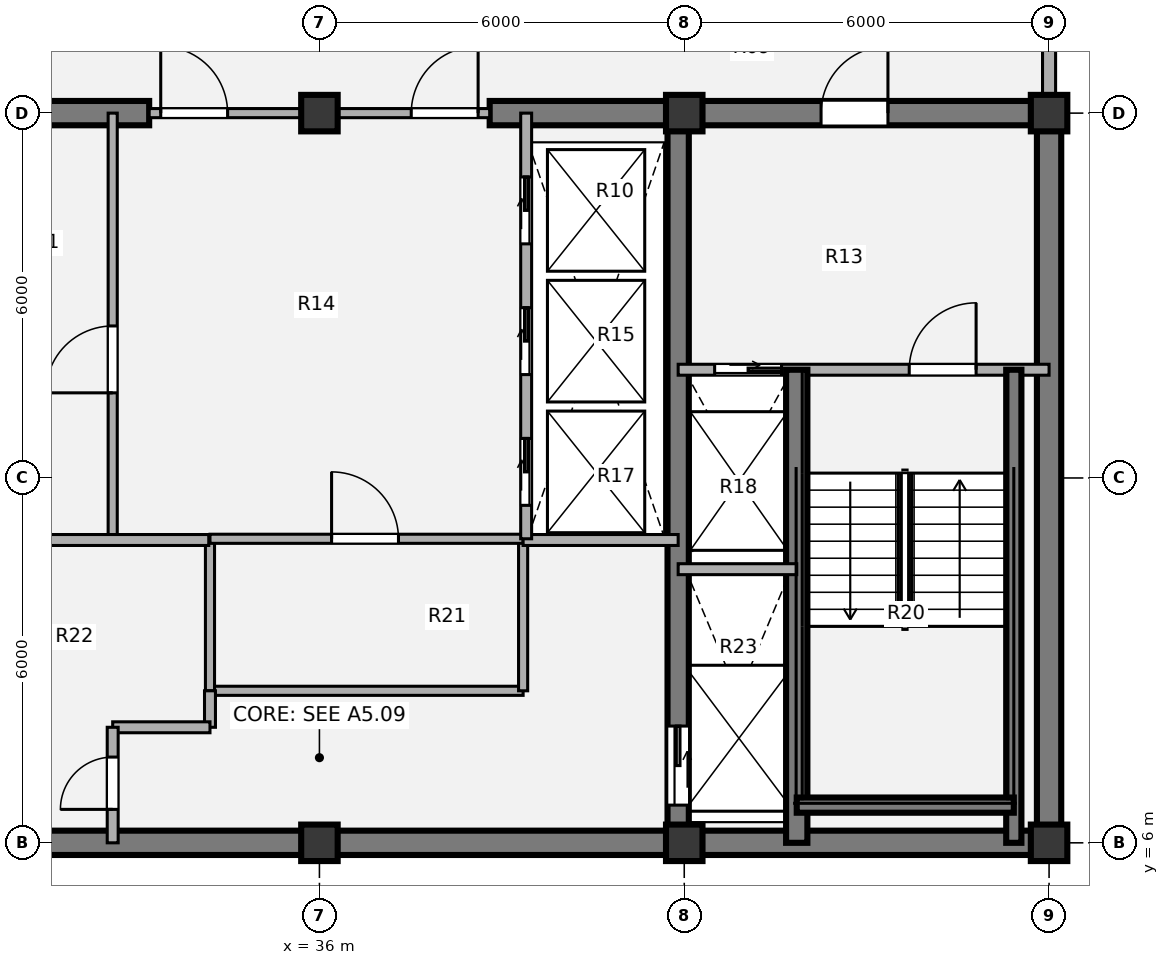
"""IFC4 building model, lengths in metres.
Left out: names, types, materials, properties, quantities, classifications, styles, units other than length and angle.
Written with IfcOpenShell. Run it as: python <this file> out.ifc"""

import sys

from ifc_helpers import new_model, si_unit, direction, frame, frame_2d, origin, origin_2d, place, context, subcontext, project, spatial, rectangle, extrude, source, transform, mapped, element, fill, save


model = new_model("IFC4")
c1 = context("Model", 3, precision=1e-05, world=origin(), true_north=direction((0.0, 1.0)))
c2 = subcontext(c1, "Body", "Model", "MODEL_VIEW")
j1 = project(units=[si_unit("LENGTHUNIT", "METRE"), si_unit("PLANEANGLEUNIT", "RADIAN")], contexts=[c1])
p1 = place(None, origin())
s1 = spatial("IfcSite", under=j1, at=p1, CompositionType="ELEMENT")
p2 = place(p1, origin())
s2 = spatial("IfcBuilding", under=s1, at=p2, CompositionType="ELEMENT")
p3 = place(p2, frame((0.0, 0.0, 253.26)))
s3 = spatial("IfcBuildingStorey", under=s2, at=p3, CompositionType="ELEMENT", Elevation=253.26)
m1 = source(origin(), c2, "Body", "SweptSolid", [
    extrude(rectangle(XDim=0.6, YDim=0.6, at=origin_2d()), origin(), (0.0, 0.0, 1.0), 3.78),
])
for number, where, z_axis, x_axis in (
    (1, (36.0, 6.0, 0.0), (0.0, 0.0, 1.0), (1.0, 0.0, 0.0)),
    (2, (42.0, 6.0, 0.0), (0.0, 0.0, 1.0), (1.0, 0.0, 0.0)),
    (3, (48.0, 6.0, 0.0), (0.0, 0.0, 1.0), (1.0, 0.0, 0.0)),
    (4, (36.0, 18.0, 0.0), (0.0, 0.0, 1.0), (1.0, 0.0, 0.0)),
    (5, (42.0, 18.0, 0.0), (0.0, 0.0, 1.0), (1.0, 0.0, 0.0)),
    (6, (48.0, 18.0, 0.0), (0.0, 0.0, 1.0), (1.0, 0.0, 0.0)),
):
    element("IfcColumn", number, at=place(p3, frame(where, z_axis=z_axis, x_axis=x_axis)), inside=s3, PredefinedType="COLUMN", context=c2, shape_type="MappedRepresentation", body=[
        mapped(m1, transform((0.0, 0.0, 0.0), x_axis=(1.0, 0.0, 0.0), y_axis=(0.0, 1.0, 0.0), z_axis=(0.0, 0.0, 1.0), scale=1.0)),
    ])
p4 = place(p3, frame((48.2, 6.0, 0.0), z_axis=(0.0, 0.0, 1.0), x_axis=(-1.0, 0.0, 0.0)))
e7 = element("IfcWall", 7, at=p4, inside=s3, PredefinedType="SHEAR", context=c2, shape_type="SweptSolid", body=[
    extrude(rectangle(XDim=24.4, YDim=0.4, at=frame_2d((12.2, 0.0))), origin(), (0.0, 0.0, 1.0), 3.78),
])
p5 = place(p3, frame((48.0, 18.0, 0.0), z_axis=(0.0, 0.0, 1.0), x_axis=(0.0, -1.0, 0.0)))
e8 = element("IfcWall", 8, at=p5, inside=s3, PredefinedType="SHEAR", context=c2, shape_type="SweptSolid", body=[
    extrude(rectangle(XDim=12.0, YDim=0.4, at=frame_2d((6.0, 0.0))), origin(), (0.0, 0.0, 1.0), 3.78),
])
p6 = place(p3, frame((23.8, 18.0, 0.0), z_axis=(0.0, 0.0, 1.0), x_axis=(1.0, 0.0, 0.0)))
e9 = element("IfcWall", 9, at=p6, inside=s3, PredefinedType="SHEAR", context=c2, shape_type="SweptSolid", body=[
    extrude(rectangle(XDim=9.4, YDim=0.4, at=frame_2d((4.7, 0.0))), origin(), (0.0, 0.0, 1.0), 3.78),
])
p7 = place(p6, frame((2.95, 0.0, 0.0)))
e10 = element("IfcOpeningElement", 10, at=p7, cuts=e9, PredefinedType="OPENING", context=c2, shape_type="SweptSolid", body=[
    extrude(rectangle(XDim=1.1, YDim=2.1, at=origin_2d()), frame((0.55, 0.21, 1.05), z_axis=(0.0, -1.0, 0.0), x_axis=(1.0, 0.0, 0.0)), (0.0, 0.0, 1.0), 0.42),
])
p8 = place(p3, frame((38.8, 18.0, 0.0), z_axis=(0.0, 0.0, 1.0), x_axis=(1.0, 0.0, 0.0)))
e11 = element("IfcWall", 11, at=p8, inside=s3, PredefinedType="SHEAR", context=c2, shape_type="SweptSolid", body=[
    extrude(rectangle(XDim=9.4, YDim=0.4, at=frame_2d((4.7, 0.0))), origin(), (0.0, 0.0, 1.0), 3.78),
])
p9 = place(p8, frame((5.45, 0.0, 0.0)))
e12 = element("IfcOpeningElement", 12, at=p9, cuts=e11, PredefinedType="OPENING", context=c2, shape_type="SweptSolid", body=[
    extrude(rectangle(XDim=1.1, YDim=2.1, at=origin_2d()), frame((0.55, 0.21, 1.05), z_axis=(0.0, -1.0, 0.0), x_axis=(1.0, 0.0, 0.0)), (0.0, 0.0, 1.0), 0.42),
])
p10 = place(p3, frame((41.9, 18.0, 0.0), z_axis=(0.0, 0.0, 1.0), x_axis=(0.0, -1.0, 0.0)))
e13 = element("IfcWall", 13, at=p10, inside=s3, PredefinedType="SHEAR", context=c2, shape_type="SweptSolid", body=[
    extrude(rectangle(XDim=12.0, YDim=0.35, at=frame_2d((6.0, 0.0))), origin(), (0.0, 0.0, 1.0), 3.78),
])
p11 = place(p10, frame((10.08, 0.0, 0.0)))
e14 = element("IfcOpeningElement", 14, at=p11, cuts=e13, PredefinedType="OPENING", context=c2, shape_type="SweptSolid", body=[
    extrude(rectangle(XDim=1.3, YDim=2.1, at=origin_2d()), frame((0.65, 0.185, 1.05), z_axis=(0.0, -1.0, 0.0), x_axis=(1.0, 0.0, 0.0)), (0.0, 0.0, 1.0), 0.37),
])
p12 = place(p3, frame((48.0, 21.05, 0.0), z_axis=(0.0, 0.0, 1.0), x_axis=(0.0, -1.0, 0.0)))
e15 = element("IfcWall", 15, at=p12, inside=s3, PredefinedType="SOLIDWALL", context=c2, shape_type="SweptSolid", body=[
    extrude(rectangle(XDim=2.77, YDim=0.215, at=frame_2d((1.385, 0.0))), origin(), (0.0, 0.0, 1.0), 2.718),
])
p13 = place(p3, frame((32.6, 11.0, 0.0), z_axis=(0.0, 0.0, 1.0), x_axis=(0.0, 1.0, 0.0)))
e16 = element("IfcWall", 16, at=p13, inside=s3, PredefinedType="PARTITIONING", context=c2, shape_type="SweptSolid", body=[
    extrude(rectangle(XDim=7.0, YDim=0.15, at=frame_2d((3.5, 0.0))), origin(), (0.0, 0.0, 1.0), 3.5),
])
p14 = place(p13, frame((2.4, 0.0, 0.0)))
e17 = element("IfcOpeningElement", 17, at=p14, cuts=e16, PredefinedType="OPENING", context=c2, shape_type="SweptSolid", body=[
    extrude(rectangle(XDim=1.1, YDim=2.1, at=origin_2d()), frame((0.55, 0.085, 1.05), z_axis=(0.0, -1.0, 0.0), x_axis=(1.0, 0.0, 0.0)), (0.0, 0.0, 1.0), 0.17),
])
p15 = place(p3, frame((34.2, 8.5, 0.0), z_axis=(0.0, 0.0, 1.0), x_axis=(1.0, 0.0, 0.0)))
e18 = element("IfcWall", 18, at=p15, inside=s3, PredefinedType="PARTITIONING", context=c2, shape_type="SweptSolid", body=[
    extrude(rectangle(XDim=5.15, YDim=0.15, at=frame_2d((2.575, 0.0))), origin(), (0.0, 0.0, 1.0), 3.5),
])
for number, where, z_axis, x_axis in (
    (19, (34.2, 8.5, 0.0), (0.0, 0.0, 1.0), (0.0, 1.0, 0.0)),
    (20, (39.35, 8.5, 0.0), (0.0, 0.0, 1.0), (0.0, 1.0, 0.0)),
):
    element("IfcWall", number, at=place(p3, frame(where, z_axis=z_axis, x_axis=x_axis)), inside=s3, PredefinedType="PARTITIONING", context=c2, shape_type="SweptSolid", body=[
        extrude(rectangle(XDim=2.5, YDim=0.15, at=frame_2d((1.25, 0.0))), origin(), (0.0, 0.0, 1.0), 3.5),
    ])
p16 = place(p3, frame((34.2, 11.0, 0.0), z_axis=(0.0, 0.0, 1.0), x_axis=(1.0, 0.0, 0.0)))
e21 = element("IfcWall", 21, at=p16, inside=s3, PredefinedType="PARTITIONING", context=c2, shape_type="SweptSolid", body=[
    extrude(rectangle(XDim=5.15, YDim=0.15, at=frame_2d((2.575, 0.0))), origin(), (0.0, 0.0, 1.0), 3.5),
])
p17 = place(p16, frame((2.0, 0.0, 0.0)))
e22 = element("IfcOpeningElement", 22, at=p17, cuts=e21, PredefinedType="OPENING", context=c2, shape_type="SweptSolid", body=[
    extrude(rectangle(XDim=1.1, YDim=2.1, at=origin_2d()), frame((0.55, 0.085, 1.05), z_axis=(0.0, -1.0, 0.0), x_axis=(1.0, 0.0, 0.0)), (0.0, 0.0, 1.0), 0.17),
])
p18 = place(p3, frame((30.1, 10.98, 0.0), z_axis=(0.0, 0.0, 1.0), x_axis=(1.0, 0.0, 0.0)))
e23 = element("IfcWall", 23, at=p18, inside=s3, PredefinedType="PARTITIONING", context=c2, shape_type="SweptSolid", body=[
    extrude(rectangle(XDim=4.08, YDim=0.18, at=frame_2d((2.04, 0.0))), origin(), (0.0, 0.0, 1.0), 3.5),
])
p19 = place(p3, frame((34.2, 7.9, 0.0), z_axis=(0.0, 0.0, 1.0), x_axis=(0.0, 1.0, 0.0)))
e24 = element("IfcWall", 24, at=p19, inside=s3, PredefinedType="PARTITIONING", context=c2, shape_type="SweptSolid", body=[
    extrude(rectangle(XDim=0.6, YDim=0.18, at=frame_2d((0.3, 0.0))), origin(), (0.0, 0.0, 1.0), 3.5),
])
p20 = place(p3, frame((32.6, 7.9, 0.0), z_axis=(0.0, 0.0, 1.0), x_axis=(1.0, 0.0, 0.0)))
e25 = element("IfcWall", 25, at=p20, inside=s3, PredefinedType="PARTITIONING", context=c2, shape_type="SweptSolid", body=[
    extrude(rectangle(XDim=1.6, YDim=0.18, at=frame_2d((0.8, 0.0))), origin(), (0.0, 0.0, 1.0), 3.5),
])
p21 = place(p3, frame((32.6, 6.0, 0.0), z_axis=(0.0, 0.0, 1.0), x_axis=(0.0, 1.0, 0.0)))
e26 = element("IfcWall", 26, at=p21, inside=s3, PredefinedType="PARTITIONING", context=c2, shape_type="SweptSolid", body=[
    extrude(rectangle(XDim=1.9, YDim=0.18, at=frame_2d((0.95, 0.0))), origin(), (0.0, 0.0, 1.0), 3.5),
])
p22 = place(p21, frame((0.55, 0.0, 0.0)))
e27 = element("IfcOpeningElement", 27, at=p22, cuts=e26, PredefinedType="OPENING", context=c2, shape_type="SweptSolid", body=[
    extrude(rectangle(XDim=0.86, YDim=2.1, at=origin_2d()), frame((0.43, 0.1, 1.05), z_axis=(0.0, -1.0, 0.0), x_axis=(1.0, 0.0, 0.0)), (0.0, 0.0, 1.0), 0.2),
])
p23 = place(p3, frame((39.35, 10.98, 0.0), z_axis=(0.0, 0.0, 1.0), x_axis=(1.0, 0.0, 0.0)))
e28 = element("IfcWall", 28, at=p23, inside=s3, PredefinedType="PARTITIONING", context=c2, shape_type="SweptSolid", body=[
    extrude(rectangle(XDim=2.55, YDim=0.18, at=frame_2d((1.275, 0.0))), origin(), (0.0, 0.0, 1.0), 3.5),
])
p24 = place(p3, frame((33.2, 18.0, 0.0), z_axis=(0.0, 0.0, 1.0), x_axis=(1.0, 0.0, 0.0)))
e29 = element("IfcWall", 29, at=p24, inside=s3, PredefinedType="PARTITIONING", context=c2, shape_type="SweptSolid", body=[
    extrude(rectangle(XDim=5.6, YDim=0.15, at=frame_2d((2.8, 0.0))), origin(), (0.0, 0.0, 1.0), 2.515),
])
p25 = place(p24, frame((0.19, 0.0, 0.0)))
e30 = element("IfcOpeningElement", 30, at=p25, cuts=e29, PredefinedType="OPENING", context=c2, shape_type="SweptSolid", body=[
    extrude(rectangle(XDim=1.1, YDim=2.1, at=origin_2d()), frame((0.55, 0.085, 1.05), z_axis=(0.0, -1.0, 0.0), x_axis=(1.0, 0.0, 0.0)), (0.0, 0.0, 1.0), 0.17),
])
p26 = place(p24, frame((4.31, 0.0, 0.0)))
e31 = element("IfcOpeningElement", 31, at=p26, cuts=e29, PredefinedType="OPENING", context=c2, shape_type="SweptSolid", body=[
    extrude(rectangle(XDim=1.1, YDim=2.1, at=origin_2d()), frame((0.55, 0.085, 1.05), z_axis=(0.0, -1.0, 0.0), x_axis=(1.0, 0.0, 0.0)), (0.0, 0.0, 1.0), 0.17),
])
p27 = place(p3, frame((41.9, 13.78, 0.0), z_axis=(0.0, 0.0, 1.0), x_axis=(1.0, 0.0, 0.0)))
e32 = element("IfcWall", 32, at=p27, inside=s3, PredefinedType="PARTITIONING", context=c2, shape_type="SweptSolid", body=[
    extrude(rectangle(XDim=6.1, YDim=0.18, at=frame_2d((3.05, 0.0))), origin(), (0.0, 0.0, 1.0), 3.5),
])
p28 = place(p27, frame((0.6, 0.0, 0.0)))
e33 = element("IfcOpeningElement", 33, at=p28, cuts=e32, PredefinedType="OPENING", context=c2, shape_type="SweptSolid", body=[
    extrude(rectangle(XDim=1.1, YDim=2.1, at=origin_2d()), frame((0.55, 0.1, 1.05), z_axis=(0.0, -1.0, 0.0), x_axis=(1.0, 0.0, 0.0)), (0.0, 0.0, 1.0), 0.2),
])
p29 = place(p27, frame((3.8, 0.0, 0.0)))
e34 = element("IfcOpeningElement", 34, at=p29, cuts=e32, PredefinedType="OPENING", context=c2, shape_type="SweptSolid", body=[
    extrude(rectangle(XDim=1.1, YDim=2.1, at=origin_2d()), frame((0.55, 0.1, 1.05), z_axis=(0.0, -1.0, 0.0), x_axis=(1.0, 0.0, 0.0)), (0.0, 0.0, 1.0), 0.2),
])
p30 = place(p3, frame((43.85, 6.0, 0.0), z_axis=(0.0, 0.0, 1.0), x_axis=(0.0, 1.0, 0.0)))
e35 = element("IfcWall", 35, at=p30, inside=s3, PredefinedType="SHEAR", context=c2, shape_type="SweptSolid", body=[
    extrude(rectangle(XDim=7.78, YDim=0.35, at=frame_2d((3.89, 0.0))), origin(), (0.0, 0.0, 1.0), 3.85),
])
p31 = place(p3, frame((47.42, 6.0, 0.0), z_axis=(0.0, 0.0, 1.0), x_axis=(0.0, 1.0, 0.0)))
e36 = element("IfcWall", 36, at=p31, inside=s3, PredefinedType="SHEAR", context=c2, shape_type="SweptSolid", body=[
    extrude(rectangle(XDim=7.78, YDim=0.25, at=frame_2d((3.89, 0.0))), origin(), (0.0, 0.0, 1.0), 3.85),
])
p32 = place(p3, frame((43.85, 6.62, 0.0), z_axis=(0.0, 0.0, 1.0), x_axis=(1.0, 0.0, 0.0)))
e37 = element("IfcWall", 37, at=p32, inside=s3, PredefinedType="SHEAR", context=c2, shape_type="SweptSolid", body=[
    extrude(rectangle(XDim=3.57, YDim=0.25, at=frame_2d((1.785, 0.0))), origin(), (0.0, 0.0, 1.0), 3.85),
])
p33 = place(p3, frame((41.9, 10.5, 0.0), z_axis=(0.0, 0.0, 1.0), x_axis=(1.0, 0.0, 0.0)))
e38 = element("IfcWall", 38, at=p33, inside=s3, PredefinedType="PARTITIONING", context=c2, shape_type="SweptSolid", body=[
    extrude(rectangle(XDim=1.95, YDim=0.18, at=frame_2d((0.975, 0.0))), origin(), (0.0, 0.0, 1.0), 3.5),
])
p34 = place(p3, frame((39.4, 11.0, 0.0), z_axis=(0.0, 0.0, 1.0), x_axis=(0.0, 1.0, 0.0)))
e39 = element("IfcWall", 39, at=p34, inside=s3, PredefinedType="PARTITIONING", context=c2, shape_type="SweptSolid", body=[
    extrude(rectangle(XDim=7.0, YDim=0.18, at=frame_2d((3.5, 0.0))), origin(), (0.0, 0.0, 1.0), 3.5),
])
p35 = place(p34, frame((0.55, 0.0, 0.0)))
e40 = element("IfcOpeningElement", 40, at=p35, cuts=e39, PredefinedType="OPENING", context=c2, shape_type="SweptSolid", body=[
    extrude(rectangle(XDim=1.1, YDim=2.1, at=origin_2d()), frame((0.55, 0.1, 1.05), z_axis=(0.0, -1.0, 0.0), x_axis=(1.0, 0.0, 0.0)), (0.0, 0.0, 1.0), 0.2),
])
p36 = place(p34, frame((2.7, 0.0, 0.0)))
e41 = element("IfcOpeningElement", 41, at=p36, cuts=e39, PredefinedType="OPENING", context=c2, shape_type="SweptSolid", body=[
    extrude(rectangle(XDim=1.1, YDim=2.1, at=origin_2d()), frame((0.55, 0.1, 1.05), z_axis=(0.0, -1.0, 0.0), x_axis=(1.0, 0.0, 0.0)), (0.0, 0.0, 1.0), 0.2),
])
p37 = place(p34, frame((4.85, 0.0, 0.0)))
e42 = element("IfcOpeningElement", 42, at=p37, cuts=e39, PredefinedType="OPENING", context=c2, shape_type="SweptSolid", body=[
    extrude(rectangle(XDim=1.1, YDim=2.1, at=origin_2d()), frame((0.55, 0.1, 1.05), z_axis=(0.0, -1.0, 0.0), x_axis=(1.0, 0.0, 0.0)), (0.0, 0.0, 1.0), 0.2),
])
m2 = source(origin(), c2, "Body", "SweptSolid", [
    extrude(rectangle(XDim=1.1, YDim=2.1, at=origin_2d()), frame((0.55, 0.025, 1.05), z_axis=(0.0, -1.0, 0.0), x_axis=(1.0, 0.0, 0.0)), (0.0, 0.0, 1.0), 0.05),
])
p38 = place(p14, origin())
e43 = element("IfcDoor", 43, at=p38, inside=s3, OperationType="SINGLE_SWING_LEFT", PredefinedType="DOOR", context=c2, shape_type="MappedRepresentation", body=[
    mapped(m2, transform((0.0, 0.0, 0.0), x_axis=(1.0, 0.0, 0.0), y_axis=(0.0, 1.0, 0.0), z_axis=(0.0, 0.0, 1.0), scale=1.0)),
])
fill(e17, e43)
p39 = place(p17, origin())
e44 = element("IfcDoor", 44, at=p39, inside=s3, OperationType="SINGLE_SWING_LEFT", PredefinedType="DOOR", context=c2, shape_type="MappedRepresentation", body=[
    mapped(m2, transform((0.0, 0.0, 0.0), x_axis=(1.0, 0.0, 0.0), y_axis=(0.0, 1.0, 0.0), z_axis=(0.0, 0.0, 1.0), scale=1.0)),
])
fill(e22, e44)
m3 = source(origin(), c2, "Body", "SweptSolid", [
    extrude(rectangle(XDim=0.86, YDim=2.1, at=origin_2d()), frame((0.43, 0.025, 1.05), z_axis=(0.0, -1.0, 0.0), x_axis=(1.0, 0.0, 0.0)), (0.0, 0.0, 1.0), 0.05),
])
p40 = place(p22, origin())
e45 = element("IfcDoor", 45, at=p40, inside=s3, OperationType="SINGLE_SWING_LEFT", PredefinedType="DOOR", context=c2, shape_type="MappedRepresentation", body=[
    mapped(m3, transform((0.0, 0.0, 0.0), x_axis=(1.0, 0.0, 0.0), y_axis=(0.0, 1.0, 0.0), z_axis=(0.0, 0.0, 1.0), scale=1.0)),
])
fill(e27, e45)
m4 = source(origin(), c2, "Body", "SweptSolid", [
    extrude(rectangle(XDim=1.1, YDim=2.1, at=origin_2d()), frame((0.55, 0.025, 1.05), z_axis=(0.0, -1.0, 0.0), x_axis=(1.0, 0.0, 0.0)), (0.0, 0.0, 1.0), 0.05),
])
p41 = place(p25, origin())
e46 = element("IfcDoor", 46, at=p41, inside=s3, OperationType="SINGLE_SWING_LEFT", PredefinedType="DOOR", context=c2, shape_type="MappedRepresentation", body=[
    mapped(m4, transform((0.0, 0.0, 0.0), x_axis=(1.0, 0.0, 0.0), y_axis=(0.0, 1.0, 0.0), z_axis=(0.0, 0.0, 1.0), scale=1.0)),
])
fill(e30, e46)
p42 = place(p26, origin())
e47 = element("IfcDoor", 47, at=p42, inside=s3, OperationType="SINGLE_SWING_RIGHT", PredefinedType="DOOR", context=c2, shape_type="MappedRepresentation", body=[
    mapped(m4, transform((0.0, 0.0, 0.0), x_axis=(1.0, 0.0, 0.0), y_axis=(0.0, 1.0, 0.0), z_axis=(0.0, 0.0, 1.0), scale=1.0)),
])
fill(e31, e47)
m5 = source(origin(), c2, "Body", "SweptSolid", [
    extrude(rectangle(XDim=1.1, YDim=2.1, at=origin_2d()), frame((0.55, 0.025, 1.05), z_axis=(0.0, -1.0, 0.0), x_axis=(1.0, 0.0, 0.0)), (0.0, 0.0, 1.0), 0.05),
])
p43 = place(p28, origin())
e48 = element("IfcDoor", 48, at=p43, inside=s3, OperationType="SLIDING_TO_RIGHT", PredefinedType="DOOR", context=c2, shape_type="MappedRepresentation", body=[
    mapped(m5, transform((0.0, 0.0, 0.0), x_axis=(1.0, 0.0, 0.0), y_axis=(0.0, 1.0, 0.0), z_axis=(0.0, 0.0, 1.0), scale=1.0)),
])
fill(e33, e48)
m6 = source(origin(), c2, "Body", "SweptSolid", [
    extrude(rectangle(XDim=1.1, YDim=2.1, at=origin_2d()), frame((0.55, 0.025, 1.05), z_axis=(0.0, -1.0, 0.0), x_axis=(1.0, 0.0, 0.0)), (0.0, 0.0, 1.0), 0.05),
])
p44 = place(p29, origin())
e49 = element("IfcDoor", 49, at=p44, inside=s3, OperationType="SINGLE_SWING_RIGHT", PredefinedType="DOOR", context=c2, shape_type="MappedRepresentation", body=[
    mapped(m6, transform((0.0, 0.0, 0.0), x_axis=(1.0, 0.0, 0.0), y_axis=(0.0, 1.0, 0.0), z_axis=(0.0, 0.0, 1.0), scale=1.0)),
])
fill(e34, e49)
m7 = source(origin(), c2, "Body", "SweptSolid", [
    extrude(rectangle(XDim=1.3, YDim=2.1, at=origin_2d()), frame((0.65, 0.025, 1.05), z_axis=(0.0, -1.0, 0.0), x_axis=(1.0, 0.0, 0.0)), (0.0, 0.0, 1.0), 0.05),
])
p45 = place(p11, origin())
e50 = element("IfcDoor", 50, at=p45, inside=s3, OperationType="SLIDING_TO_LEFT", PredefinedType="DOOR", context=c2, shape_type="MappedRepresentation", body=[
    mapped(m7, transform((0.0, 0.0, 0.0), x_axis=(1.0, 0.0, 0.0), y_axis=(0.0, 1.0, 0.0), z_axis=(0.0, 0.0, 1.0), scale=1.0)),
])
fill(e14, e50)
p46 = place(p9, origin())
e51 = element("IfcDoor", 51, at=p46, inside=s3, OperationType="SINGLE_SWING_RIGHT", PredefinedType="DOOR", context=c2, shape_type="MappedRepresentation", body=[
    mapped(m4, transform((0.0, 0.0, 0.0), x_axis=(1.0, 0.0, 0.0), y_axis=(0.0, 1.0, 0.0), z_axis=(0.0, 0.0, 1.0), scale=1.0)),
])
fill(e12, e51)
p47 = place(p35, origin())
e52 = element("IfcDoor", 52, at=p47, inside=s3, OperationType="SLIDING_TO_RIGHT", PredefinedType="DOOR", context=c2, shape_type="MappedRepresentation", body=[
    mapped(m5, transform((0.0, 0.0, 0.0), x_axis=(1.0, 0.0, 0.0), y_axis=(0.0, 1.0, 0.0), z_axis=(0.0, 0.0, 1.0), scale=1.0)),
])
fill(e40, e52)
p48 = place(p36, origin())
e53 = element("IfcDoor", 53, at=p48, inside=s3, OperationType="SLIDING_TO_RIGHT", PredefinedType="DOOR", context=c2, shape_type="MappedRepresentation", body=[
    mapped(m5, transform((0.0, 0.0, 0.0), x_axis=(1.0, 0.0, 0.0), y_axis=(0.0, 1.0, 0.0), z_axis=(0.0, 0.0, 1.0), scale=1.0)),
])
fill(e41, e53)
p49 = place(p37, origin())
e54 = element("IfcDoor", 54, at=p49, inside=s3, OperationType="SLIDING_TO_RIGHT", PredefinedType="DOOR", context=c2, shape_type="MappedRepresentation", body=[
    mapped(m5, transform((0.0, 0.0, 0.0), x_axis=(1.0, 0.0, 0.0), y_axis=(0.0, 1.0, 0.0), z_axis=(0.0, 0.0, 1.0), scale=1.0)),
])
fill(e42, e54)
save(model, sys.argv[1])
